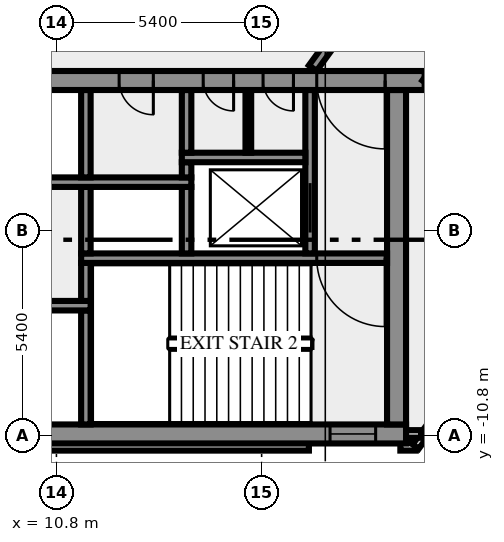
"""IFC4 building model, lengths in metres.
Left out: names, types, materials, properties, quantities, classifications, styles, units other than length and angle.
Written with IfcOpenShell. Run it as: python <this file> out.ifc"""

import sys

from ifc_helpers import new_model, si_unit, direction, frame, frame_2d, origin, place, context, subcontext, project, spatial, rectangle, extrude, element, fill, save


model = new_model("IFC4")
c1 = context("Model", 3, precision=1e-05, world=origin(), true_north=direction((0.0, 1.0)))
c2 = subcontext(c1, "Body", "Model", "MODEL_VIEW")
j1 = project(units=[si_unit("LENGTHUNIT", "METRE"), si_unit("PLANEANGLEUNIT", "RADIAN")], contexts=[c1])
p1 = place(None, origin())
s1 = spatial("IfcSite", under=j1, at=p1, CompositionType="ELEMENT")
p2 = place(p1, origin())
s2 = spatial("IfcBuilding", under=s1, at=p2, CompositionType="ELEMENT")
p3 = place(p2, frame((0.0, 0.0, 59.0)))
s3 = spatial("IfcBuildingStorey", under=s2, at=p3, CompositionType="ELEMENT", Elevation=59.0)
p4 = place(p3, frame((-17.444, -11.088, 0.0), z_axis=(0.0, 0.0, 1.0), x_axis=(1.0, 0.0, 0.0)))
e1 = element("IfcWall", 1, at=p4, inside=s3, PredefinedType="SOLIDWALL", context=c2, shape_type="SweptSolid", body=[
    extrude(rectangle(XDim=34.888, YDim=0.2, at=frame_2d((17.444, 0.0))), origin(), (0.0, 0.0, 1.0), 3.65),
])
p5 = place(p3, frame((19.85, -11.088, 0.0), z_axis=(0.0, 0.0, 1.0), x_axis=(1.0, 0.0, 0.0)))
e2 = element("IfcWall", 2, at=p5, inside=s3, PredefinedType="SOLIDWALL", context=c2, shape_type="SweptSolid", body=[
    extrude(rectangle(XDim=0.406, YDim=0.2, at=frame_2d((0.203, 0.0))), origin(), (0.0, 0.0, 1.0), 3.65),
])
p6 = place(p3, frame((20.253, -11.083, 0.0), z_axis=(0.0, 0.0, 1.0), x_axis=(0.587766567315, 0.809030569476, 0.0)))
e3 = element("IfcWall", 3, at=p6, inside=s3, PredefinedType="SOLIDWALL", context=c2, shape_type="SweptSolid", body=[
    extrude(rectangle(XDim=2.688, YDim=0.2, at=frame_2d((1.344, 0.0))), origin(), (0.0, 0.0, 1.0), 3.65),
])
p7 = place(p3, frame((19.98, -10.75, 0.0), z_axis=(0.0, 0.0, 1.0), x_axis=(1.0, 0.0, 0.0)))
e4 = element("IfcWall", 4, at=p7, inside=s3, PredefinedType="SOLIDWALL", context=c2, shape_type="SweptSolid", body=[
    extrude(rectangle(XDim=0.417, YDim=0.2, at=frame_2d((0.208, 0.0))), origin(), (0.0, 0.0, 1.0), 3.65),
])
p8 = place(p3, frame((-20.0, -10.75, 0.0), z_axis=(0.0, 0.0, 1.0), x_axis=(1.0, 0.0, 0.0)))
e5 = element("IfcWall", 5, at=p8, inside=s3, PredefinedType="SHEAR", context=c2, shape_type="SweptSolid", body=[
    extrude(rectangle(XDim=40.0, YDim=0.5, at=frame_2d((20.0, 0.0))), origin(), (0.0, 0.0, 1.0), 3.65),
])
p9 = place(p8, frame((0.8, 0.0, 1.0)))
e6 = element("IfcOpeningElement", 6, at=p9, cuts=e5, PredefinedType="OPENING", context=c2, shape_type="SweptSolid", body=[
    extrude(rectangle(XDim=1.2, YDim=1.2, at=frame_2d((0.6, 0.6))), frame((0.0, 0.26, 0.0), z_axis=(0.0, -1.0, 0.0), x_axis=(1.0, 0.0, 0.0)), (0.0, 0.0, 1.0), 0.52),
])
p10 = place(p8, frame((38.0, 0.0, 1.0)))
e7 = element("IfcOpeningElement", 7, at=p10, cuts=e5, PredefinedType="OPENING", context=c2, shape_type="SweptSolid", body=[
    extrude(rectangle(XDim=1.2, YDim=1.2, at=frame_2d((0.6, 0.6))), frame((0.0, 0.26, 0.0), z_axis=(0.0, -1.0, 0.0), x_axis=(1.0, 0.0, 0.0)), (0.0, 0.0, 1.0), 0.52),
])
p11 = place(p3, frame((11.575, -10.5, 0.0), z_axis=(0.0, 0.0, 1.0), x_axis=(0.0, 1.0, 0.0)))
e8 = element("IfcWall", 8, at=p11, inside=s3, PredefinedType="SHEAR", context=c2, shape_type="SweptSolid", body=[
    extrude(rectangle(XDim=3.0, YDim=0.25, at=frame_2d((1.5, 0.0))), origin(), (0.0, 0.0, 1.0), 3.65),
])
p12 = place(p3, frame((19.75, -10.5, 0.0), z_axis=(0.0, 0.0, 1.0), x_axis=(0.0, 1.0, 0.0)))
e9 = element("IfcWall", 9, at=p12, inside=s3, PredefinedType="SHEAR", context=c2, shape_type="SweptSolid", body=[
    extrude(rectangle(XDim=8.8, YDim=0.5, at=frame_2d((4.4, 0.0))), origin(), (0.0, 0.0, 1.0), 3.65),
])
p13 = place(p3, frame((11.7, -7.375, 0.0), z_axis=(0.0, 0.0, 1.0), x_axis=(-1.0, 0.0, 0.0)))
e10 = element("IfcWall", 10, at=p13, inside=s3, PredefinedType="SHEAR", context=c2, shape_type="SweptSolid", body=[
    extrude(rectangle(XDim=23.4, YDim=0.25, at=frame_2d((11.7, 0.0))), origin(), (0.0, 0.0, 1.0), 3.65),
])
p14 = place(p13, frame((21.45, 0.0, 0.0)))
e11 = element("IfcOpeningElement", 11, at=p14, cuts=e10, PredefinedType="OPENING", context=c2, shape_type="SweptSolid", body=[
    extrude(rectangle(XDim=1.1, YDim=2.1, at=frame_2d((0.55, 1.05))), frame((0.0, 0.135, 0.0), z_axis=(0.0, -1.0, 0.0), x_axis=(1.0, 0.0, 0.0)), (0.0, 0.0, 1.0), 0.27),
])
p15 = place(p13, frame((18.95, 0.0, 0.0)))
e12 = element("IfcOpeningElement", 12, at=p15, cuts=e10, PredefinedType="OPENING", context=c2, shape_type="SweptSolid", body=[
    extrude(rectangle(XDim=1.1, YDim=2.1, at=frame_2d((0.55, 1.05))), frame((0.0, 0.135, 0.0), z_axis=(0.0, -1.0, 0.0), x_axis=(1.0, 0.0, 0.0)), (0.0, 0.0, 1.0), 0.27),
])
p16 = place(p13, frame((16.45, 0.0, 0.0)))
e13 = element("IfcOpeningElement", 13, at=p16, cuts=e10, PredefinedType="OPENING", context=c2, shape_type="SweptSolid", body=[
    extrude(rectangle(XDim=1.1, YDim=2.1, at=frame_2d((0.55, 1.05))), frame((0.0, 0.135, 0.0), z_axis=(0.0, -1.0, 0.0), x_axis=(1.0, 0.0, 0.0)), (0.0, 0.0, 1.0), 0.27),
])
p17 = place(p13, frame((14.5, 0.0, 0.0)))
e14 = element("IfcOpeningElement", 14, at=p17, cuts=e10, PredefinedType="OPENING", context=c2, shape_type="SweptSolid", body=[
    extrude(rectangle(XDim=0.9, YDim=2.1, at=frame_2d((0.45, 1.05))), frame((0.0, 0.135, 0.0), z_axis=(0.0, -1.0, 0.0), x_axis=(1.0, 0.0, 0.0)), (0.0, 0.0, 1.0), 0.27),
])
p18 = place(p13, frame((12.95, 0.0, 0.0)))
e15 = element("IfcOpeningElement", 15, at=p18, cuts=e10, PredefinedType="OPENING", context=c2, shape_type="SweptSolid", body=[
    extrude(rectangle(XDim=0.9, YDim=2.1, at=frame_2d((0.45, 1.05))), frame((0.0, 0.135, 0.0), z_axis=(0.0, -1.0, 0.0), x_axis=(1.0, 0.0, 0.0)), (0.0, 0.0, 1.0), 0.27),
])
p19 = place(p13, frame((11.475, 0.0, 0.0)))
e16 = element("IfcOpeningElement", 16, at=p19, cuts=e10, PredefinedType="OPENING", context=c2, shape_type="SweptSolid", body=[
    extrude(rectangle(XDim=0.9, YDim=2.1, at=frame_2d((0.45, 1.05))), frame((0.0, 0.135, 0.0), z_axis=(0.0, -1.0, 0.0), x_axis=(1.0, 0.0, 0.0)), (0.0, 0.0, 1.0), 0.27),
])
p20 = place(p13, frame((10.45, 0.0, 0.0)))
e17 = element("IfcOpeningElement", 17, at=p20, cuts=e10, PredefinedType="OPENING", context=c2, shape_type="SweptSolid", body=[
    extrude(rectangle(XDim=0.5, YDim=2.1, at=frame_2d((0.25, 1.05))), frame((0.0, 0.135, 0.0), z_axis=(0.0, -1.0, 0.0), x_axis=(1.0, 0.0, 0.0)), (0.0, 0.0, 1.0), 0.27),
])
p21 = place(p3, frame((11.575, -7.25, 0.0), z_axis=(0.0, 0.0, 1.0), x_axis=(0.0, 1.0, 0.0)))
e18 = element("IfcWall", 18, at=p21, inside=s3, PredefinedType="SHEAR", context=c2, shape_type="SweptSolid", body=[
    extrude(rectangle(XDim=1.0, YDim=0.25, at=frame_2d((0.5, 0.0))), origin(), (0.0, 0.0, 1.0), 3.65),
])
p22 = place(p3, frame((19.5, -6.125, 0.0), z_axis=(0.0, 0.0, 1.0), x_axis=(-1.0, 0.0, 0.0)))
e19 = element("IfcWall", 19, at=p22, inside=s3, PredefinedType="SHEAR", context=c2, shape_type="SweptSolid", body=[
    extrude(rectangle(XDim=8.05, YDim=0.25, at=frame_2d((4.025, 0.0))), origin(), (0.0, 0.0, 1.0), 3.65),
])
p23 = place(p22, frame((0.05, 0.0, 0.0)))
e20 = element("IfcOpeningElement", 20, at=p23, cuts=e19, PredefinedType="OPENING", context=c2, shape_type="SweptSolid", body=[
    extrude(rectangle(XDim=1.8, YDim=2.1, at=frame_2d((0.9, 1.05))), frame((0.0, 0.135, 0.0), z_axis=(0.0, -1.0, 0.0), x_axis=(1.0, 0.0, 0.0)), (0.0, 0.0, 1.0), 0.27),
])
for number, where, z_axis, x_axis in (
    (21, (11.575, -6.0, 0.0), (0.0, 0.0, 1.0), (0.0, 1.0, 0.0)),
    (22, (14.225, -6.0, 0.0), (0.0, 0.0, 1.0), (0.0, 1.0, 0.0)),
):
    element("IfcWall", number, at=place(p3, frame(where, z_axis=z_axis, x_axis=x_axis)), inside=s3, PredefinedType="SHEAR", context=c2, shape_type="SweptSolid", body=[
        extrude(rectangle(XDim=1.75, YDim=0.25, at=frame_2d((0.875, 0.0))), origin(), (0.0, 0.0, 1.0), 3.65),
    ])
p24 = place(p3, frame((17.475, -6.0, 0.0), z_axis=(0.0, 0.0, 1.0), x_axis=(0.0, 1.0, 0.0)))
e23 = element("IfcWall", 23, at=p24, inside=s3, PredefinedType="SHEAR", context=c2, shape_type="SweptSolid", body=[
    extrude(rectangle(XDim=4.3, YDim=0.25, at=frame_2d((2.15, 0.0))), origin(), (0.0, 0.0, 1.0), 3.65),
])
p25 = place(p24, frame((0.55, 0.0, 0.0)))
e24 = element("IfcOpeningElement", 24, at=p25, cuts=e23, PredefinedType="OPENING", context=c2, shape_type="SweptSolid", body=[
    extrude(rectangle(XDim=1.3, YDim=2.1, at=frame_2d((0.65, 1.05))), frame((0.0, 0.135, 0.0), z_axis=(0.0, -1.0, 0.0), x_axis=(1.0, 0.0, 0.0)), (0.0, 0.0, 1.0), 0.27),
])
p26 = place(p3, frame((1.45, -4.125, 0.0), z_axis=(0.0, 0.0, 1.0), x_axis=(1.0, 0.0, 0.0)))
e25 = element("IfcWall", 25, at=p26, inside=s3, PredefinedType="SHEAR", context=c2, shape_type="SweptSolid", body=[
    extrude(rectangle(XDim=12.9, YDim=0.25, at=frame_2d((6.45, 0.0))), origin(), (0.0, 0.0, 1.0), 3.65),
])
p27 = place(p26, frame((0.7, 0.0, 0.0)))
e26 = element("IfcOpeningElement", 26, at=p27, cuts=e25, PredefinedType="OPENING", context=c2, shape_type="SweptSolid", body=[
    extrude(rectangle(XDim=1.3, YDim=2.1, at=frame_2d((0.65, 1.05))), frame((0.0, 0.135, 0.0), z_axis=(0.0, -1.0, 0.0), x_axis=(1.0, 0.0, 0.0)), (0.0, 0.0, 1.0), 0.27),
])
p28 = place(p3, frame((11.575, -4.0, 0.0), z_axis=(0.0, 0.0, 1.0), x_axis=(0.0, 1.0, 0.0)))
e27 = element("IfcWall", 27, at=p28, inside=s3, PredefinedType="SHEAR", context=c2, shape_type="SweptSolid", body=[
    extrude(rectangle(XDim=2.3, YDim=0.25, at=frame_2d((1.15, 0.0))), origin(), (0.0, 0.0, 1.0), 3.65),
])
p29 = place(p3, frame((14.225, -4.0, 0.0), z_axis=(0.0, 0.0, 1.0), x_axis=(0.0, 1.0, 0.0)))
e28 = element("IfcWall", 28, at=p29, inside=s3, PredefinedType="SHEAR", context=c2, shape_type="SweptSolid", body=[
    extrude(rectangle(XDim=0.4, YDim=0.25, at=frame_2d((0.2, 0.0))), origin(), (0.0, 0.0, 1.0), 3.65),
])
p30 = place(p3, frame((14.1, -3.475, 0.0), z_axis=(0.0, 0.0, 1.0), x_axis=(1.0, 0.0, 0.0)))
e29 = element("IfcWall", 29, at=p30, inside=s3, PredefinedType="SHEAR", context=c2, shape_type="SweptSolid", body=[
    extrude(rectangle(XDim=3.25, YDim=0.25, at=frame_2d((1.625, 0.0))), origin(), (0.0, 0.0, 1.0), 3.65),
])
p31 = place(p3, frame((14.225, -3.35, 0.0), z_axis=(0.0, 0.0, 1.0), x_axis=(0.0, 1.0, 0.0)))
e30 = element("IfcWall", 30, at=p31, inside=s3, PredefinedType="SHEAR", context=c2, shape_type="SweptSolid", body=[
    extrude(rectangle(XDim=1.65, YDim=0.25, at=frame_2d((0.825, 0.0))), origin(), (0.0, 0.0, 1.0), 3.65),
])
p32 = place(p3, frame((15.85, -3.35, 0.0), z_axis=(0.0, 0.0, 1.0), x_axis=(0.0, 1.0, 0.0)))
e31 = element("IfcWall", 31, at=p32, inside=s3, PredefinedType="PARTITIONING", context=c2, shape_type="SweptSolid", body=[
    extrude(rectangle(XDim=1.65, YDim=0.15, at=frame_2d((0.825, 0.0))), origin(), (0.0, 0.0, 1.0), 3.65),
])
p33 = place(p3, frame((20.49, -1.45, 0.0), z_axis=(0.0, 0.0, 1.0), x_axis=(-1.0, 0.0, 0.0)))
e32 = element("IfcWall", 32, at=p33, inside=s3, PredefinedType="SHEAR", context=c2, shape_type="SweptSolid", body=[
    extrude(rectangle(XDim=40.98, YDim=0.5, at=frame_2d((20.49, 0.0))), origin(), (0.0, 0.0, 1.0), 3.65),
])
p34 = place(p33, frame((38.14, 0.0, 0.0)))
e33 = element("IfcOpeningElement", 33, at=p34, cuts=e32, PredefinedType="OPENING", context=c2, shape_type="SweptSolid", body=[
    extrude(rectangle(XDim=1.8, YDim=2.1, at=frame_2d((0.9, 1.05))), frame((0.0, 0.26, 0.0), z_axis=(0.0, -1.0, 0.0), x_axis=(1.0, 0.0, 0.0)), (0.0, 0.0, 1.0), 0.52),
])
p35 = place(p33, frame((35.89, 0.0, 0.0)))
e34 = element("IfcOpeningElement", 34, at=p35, cuts=e32, PredefinedType="OPENING", context=c2, shape_type="SweptSolid", body=[
    extrude(rectangle(XDim=0.9, YDim=2.1, at=frame_2d((0.45, 1.05))), frame((0.0, 0.26, 0.0), z_axis=(0.0, -1.0, 0.0), x_axis=(1.0, 0.0, 0.0)), (0.0, 0.0, 1.0), 0.52),
])
p36 = place(p33, frame((32.94, 0.0, 0.0)))
e35 = element("IfcOpeningElement", 35, at=p36, cuts=e32, PredefinedType="OPENING", context=c2, shape_type="SweptSolid", body=[
    extrude(rectangle(XDim=0.9, YDim=2.1, at=frame_2d((0.45, 1.05))), frame((0.0, 0.26, 0.0), z_axis=(0.0, -1.0, 0.0), x_axis=(1.0, 0.0, 0.0)), (0.0, 0.0, 1.0), 0.52),
])
p37 = place(p33, frame((19.59, 0.0, 0.0)))
e36 = element("IfcOpeningElement", 36, at=p37, cuts=e32, PredefinedType="OPENING", context=c2, shape_type="SweptSolid", body=[
    extrude(rectangle(XDim=2.0, YDim=2.1, at=frame_2d((1.0, 1.05))), frame((0.0, 0.26, 0.0), z_axis=(0.0, -1.0, 0.0), x_axis=(1.0, 0.0, 0.0)), (0.0, 0.0, 1.0), 0.52),
])
p38 = place(p33, frame((7.14, 0.0, 0.0)))
e37 = element("IfcOpeningElement", 37, at=p38, cuts=e32, PredefinedType="OPENING", context=c2, shape_type="SweptSolid", body=[
    extrude(rectangle(XDim=0.9, YDim=2.1, at=frame_2d((0.45, 1.05))), frame((0.0, 0.26, 0.0), z_axis=(0.0, -1.0, 0.0), x_axis=(1.0, 0.0, 0.0)), (0.0, 0.0, 1.0), 0.52),
])
p39 = place(p33, frame((5.028, 0.0, 0.0)))
e38 = element("IfcOpeningElement", 38, at=p39, cuts=e32, PredefinedType="OPENING", context=c2, shape_type="SweptSolid", body=[
    extrude(rectangle(XDim=0.8, YDim=2.1, at=frame_2d((0.4, 1.05))), frame((0.0, 0.26, 0.0), z_axis=(0.0, -1.0, 0.0), x_axis=(1.0, 0.0, 0.0)), (0.0, 0.0, 1.0), 0.52),
])
p40 = place(p33, frame((3.452, 0.0, 0.0)))
e39 = element("IfcOpeningElement", 39, at=p40, cuts=e32, PredefinedType="OPENING", context=c2, shape_type="SweptSolid", body=[
    extrude(rectangle(XDim=0.8, YDim=2.1, at=frame_2d((0.4, 1.05))), frame((0.0, 0.26, 0.0), z_axis=(0.0, -1.0, 0.0), x_axis=(1.0, 0.0, 0.0)), (0.0, 0.0, 1.0), 0.52),
])
p41 = place(p33, frame((1.04, 0.0, 0.0)))
e40 = element("IfcOpeningElement", 40, at=p41, cuts=e32, PredefinedType="OPENING", context=c2, shape_type="SweptSolid", body=[
    extrude(rectangle(XDim=1.8, YDim=2.1, at=frame_2d((0.9, 1.05))), frame((0.0, 0.26, 0.0), z_axis=(0.0, -1.0, 0.0), x_axis=(1.0, 0.0, 0.0)), (0.0, 0.0, 1.0), 0.52),
])
p42 = place(p3, frame((17.545, -1.125, 0.0), z_axis=(0.0, 0.0, 1.0), x_axis=(0.587786323093, 0.809016216391, 0.0)))
e41 = element("IfcWall", 41, at=p42, inside=s3, PredefinedType="SOLIDWALL", context=c2, shape_type="SweptSolid", body=[
    extrude(rectangle(XDim=33.493, YDim=0.25, at=frame_2d((16.747, 0.0))), origin(), (0.0, 0.0, 1.0), 3.65),
])
p43 = place(p42, frame((31.403, 0.0, 0.0)))
e42 = element("IfcOpeningElement", 42, at=p43, cuts=e41, PredefinedType="OPENING", context=c2, shape_type="SweptSolid", body=[
    extrude(rectangle(XDim=1.8, YDim=2.1, at=frame_2d((0.9, 1.05))), frame((0.0, 0.135, 0.0), z_axis=(0.0, -1.0, 0.0), x_axis=(1.0, 0.0, 0.0)), (0.0, 0.0, 1.0), 0.27),
])
p44 = place(p42, frame((3.392, 0.0, 0.0)))
e43 = element("IfcOpeningElement", 43, at=p44, cuts=e41, PredefinedType="OPENING", context=c2, shape_type="SweptSolid", body=[
    extrude(rectangle(XDim=1.8, YDim=2.1, at=frame_2d((0.9, 1.05))), frame((0.0, 0.135, 0.0), z_axis=(0.0, -1.0, 0.0), x_axis=(1.0, 0.0, 0.0)), (0.0, 0.0, 1.0), 0.27),
])
p45 = place(p3, frame((43.467, 30.045, 0.0), z_axis=(0.0, 0.0, 1.0), x_axis=(-0.587784726077, -0.809017376692, 0.0)))
e44 = element("IfcWall", 44, at=p45, inside=s3, PredefinedType="SOLIDWALL", context=c2, shape_type="SweptSolid", body=[
    extrude(rectangle(XDim=39.02, YDim=0.25, at=frame_2d((19.51, 0.0))), origin(), (0.0, 0.0, 1.0), 3.65),
])
p46 = place(p45, frame((11.404, 0.0, 0.0)))
e45 = element("IfcOpeningElement", 45, at=p46, cuts=e44, PredefinedType="OPENING", context=c2, shape_type="SweptSolid", body=[
    extrude(rectangle(XDim=0.9, YDim=2.1, at=frame_2d((0.45, 1.05))), frame((0.0, 0.135, 0.0), z_axis=(0.0, -1.0, 0.0), x_axis=(1.0, 0.0, 0.0)), (0.0, 0.0, 1.0), 0.27),
])
p47 = place(p45, frame((13.004, 0.0, 0.0)))
e46 = element("IfcOpeningElement", 46, at=p47, cuts=e44, PredefinedType="OPENING", context=c2, shape_type="SweptSolid", body=[
    extrude(rectangle(XDim=1.0, YDim=2.1, at=frame_2d((0.5, 1.05))), frame((0.0, 0.135, 0.0), z_axis=(0.0, -1.0, 0.0), x_axis=(1.0, 0.0, 0.0)), (0.0, 0.0, 1.0), 0.27),
])
p48 = place(p45, frame((37.287, 0.0, 0.0)))
e47 = element("IfcOpeningElement", 47, at=p48, cuts=e44, PredefinedType="OPENING", context=c2, shape_type="SweptSolid", body=[
    extrude(rectangle(XDim=1.2, YDim=2.1, at=frame_2d((0.6, 1.05))), frame((0.0, 0.135, 0.0), z_axis=(0.0, -1.0, 0.0), x_axis=(1.0, 0.0, 0.0)), (0.0, 0.0, 1.0), 0.27),
])
p49 = place(p45, frame((0.224, 0.0, 0.0)))
e48 = element("IfcOpeningElement", 48, at=p49, cuts=e44, PredefinedType="OPENING", context=c2, shape_type="SweptSolid", body=[
    extrude(rectangle(XDim=0.9, YDim=2.1, at=frame_2d((0.45, 1.05))), frame((0.0, 0.135, 0.0), z_axis=(0.0, -1.0, 0.0), x_axis=(1.0, 0.0, 0.0)), (0.0, 0.0, 1.0), 0.27),
])
p50 = place(p10, origin())
e49 = element("IfcWindow", 49, at=p50, inside=s3, PartitioningType="SINGLE_PANEL", PredefinedType="WINDOW", context=c2, shape_type="SweptSolid", body=[
    extrude(rectangle(XDim=1.2, YDim=1.2, at=frame_2d((0.6, 0.6))), frame((0.0, 0.03, 0.0), z_axis=(0.0, -1.0, 0.0), x_axis=(1.0, 0.0, 0.0)), (0.0, 0.0, 1.0), 0.06),
])
fill(e7, e49)
p51 = place(p23, origin())
e50 = element("IfcDoor", 50, at=p51, inside=s3, OperationType="DOUBLE_DOOR_SINGLE_SWING", PredefinedType="DOOR", context=c2, shape_type="SweptSolid", body=[
    extrude(rectangle(XDim=1.8, YDim=2.1, at=frame_2d((0.9, 1.05))), frame((0.0, 0.025, 0.0), z_axis=(0.0, -1.0, 0.0), x_axis=(1.0, 0.0, 0.0)), (0.0, 0.0, 1.0), 0.05),
])
fill(e20, e50)
p52 = place(p25, origin())
e51 = element("IfcDoor", 51, at=p52, inside=s3, OperationType="DOUBLE_DOOR_SLIDING", PredefinedType="DOOR", context=c2, shape_type="SweptSolid", body=[
    extrude(rectangle(XDim=1.3, YDim=2.1, at=frame_2d((0.65, 1.05))), frame((0.0, 0.025, 0.0), z_axis=(0.0, -1.0, 0.0), x_axis=(1.0, 0.0, 0.0)), (0.0, 0.0, 1.0), 0.05),
])
fill(e24, e51)
p53 = place(p38, origin())
e52 = element("IfcDoor", 52, at=p53, inside=s3, OperationType="SINGLE_SWING_LEFT", PredefinedType="DOOR", context=c2, shape_type="SweptSolid", body=[
    extrude(rectangle(XDim=0.9, YDim=2.1, at=frame_2d((0.45, 1.05))), frame((0.0, 0.025, 0.0), z_axis=(0.0, -1.0, 0.0), x_axis=(1.0, 0.0, 0.0)), (0.0, 0.0, 1.0), 0.05),
])
fill(e37, e52)
p54 = place(p39, origin())
e53 = element("IfcDoor", 53, at=p54, inside=s3, OperationType="SINGLE_SWING_LEFT", PredefinedType="DOOR", context=c2, shape_type="SweptSolid", body=[
    extrude(rectangle(XDim=0.8, YDim=2.1, at=frame_2d((0.4, 1.05))), frame((0.0, 0.025, 0.0), z_axis=(0.0, -1.0, 0.0), x_axis=(1.0, 0.0, 0.0)), (0.0, 0.0, 1.0), 0.05),
])
fill(e38, e53)
p55 = place(p40, origin())
e54 = element("IfcDoor", 54, at=p55, inside=s3, OperationType="SINGLE_SWING_LEFT", PredefinedType="DOOR", context=c2, shape_type="SweptSolid", body=[
    extrude(rectangle(XDim=0.8, YDim=2.1, at=frame_2d((0.4, 1.05))), frame((0.0, 0.025, 0.0), z_axis=(0.0, -1.0, 0.0), x_axis=(1.0, 0.0, 0.0)), (0.0, 0.0, 1.0), 0.05),
])
fill(e39, e54)
p56 = place(p41, origin())
e55 = element("IfcDoor", 55, at=p56, inside=s3, OperationType="DOUBLE_DOOR_SINGLE_SWING", PredefinedType="DOOR", context=c2, shape_type="SweptSolid", body=[
    extrude(rectangle(XDim=1.8, YDim=2.1, at=frame_2d((0.9, 1.05))), frame((0.0, 0.025, 0.0), z_axis=(0.0, -1.0, 0.0), x_axis=(1.0, 0.0, 0.0)), (0.0, 0.0, 1.0), 0.05),
])
fill(e40, e55)
save(model, sys.argv[1])
